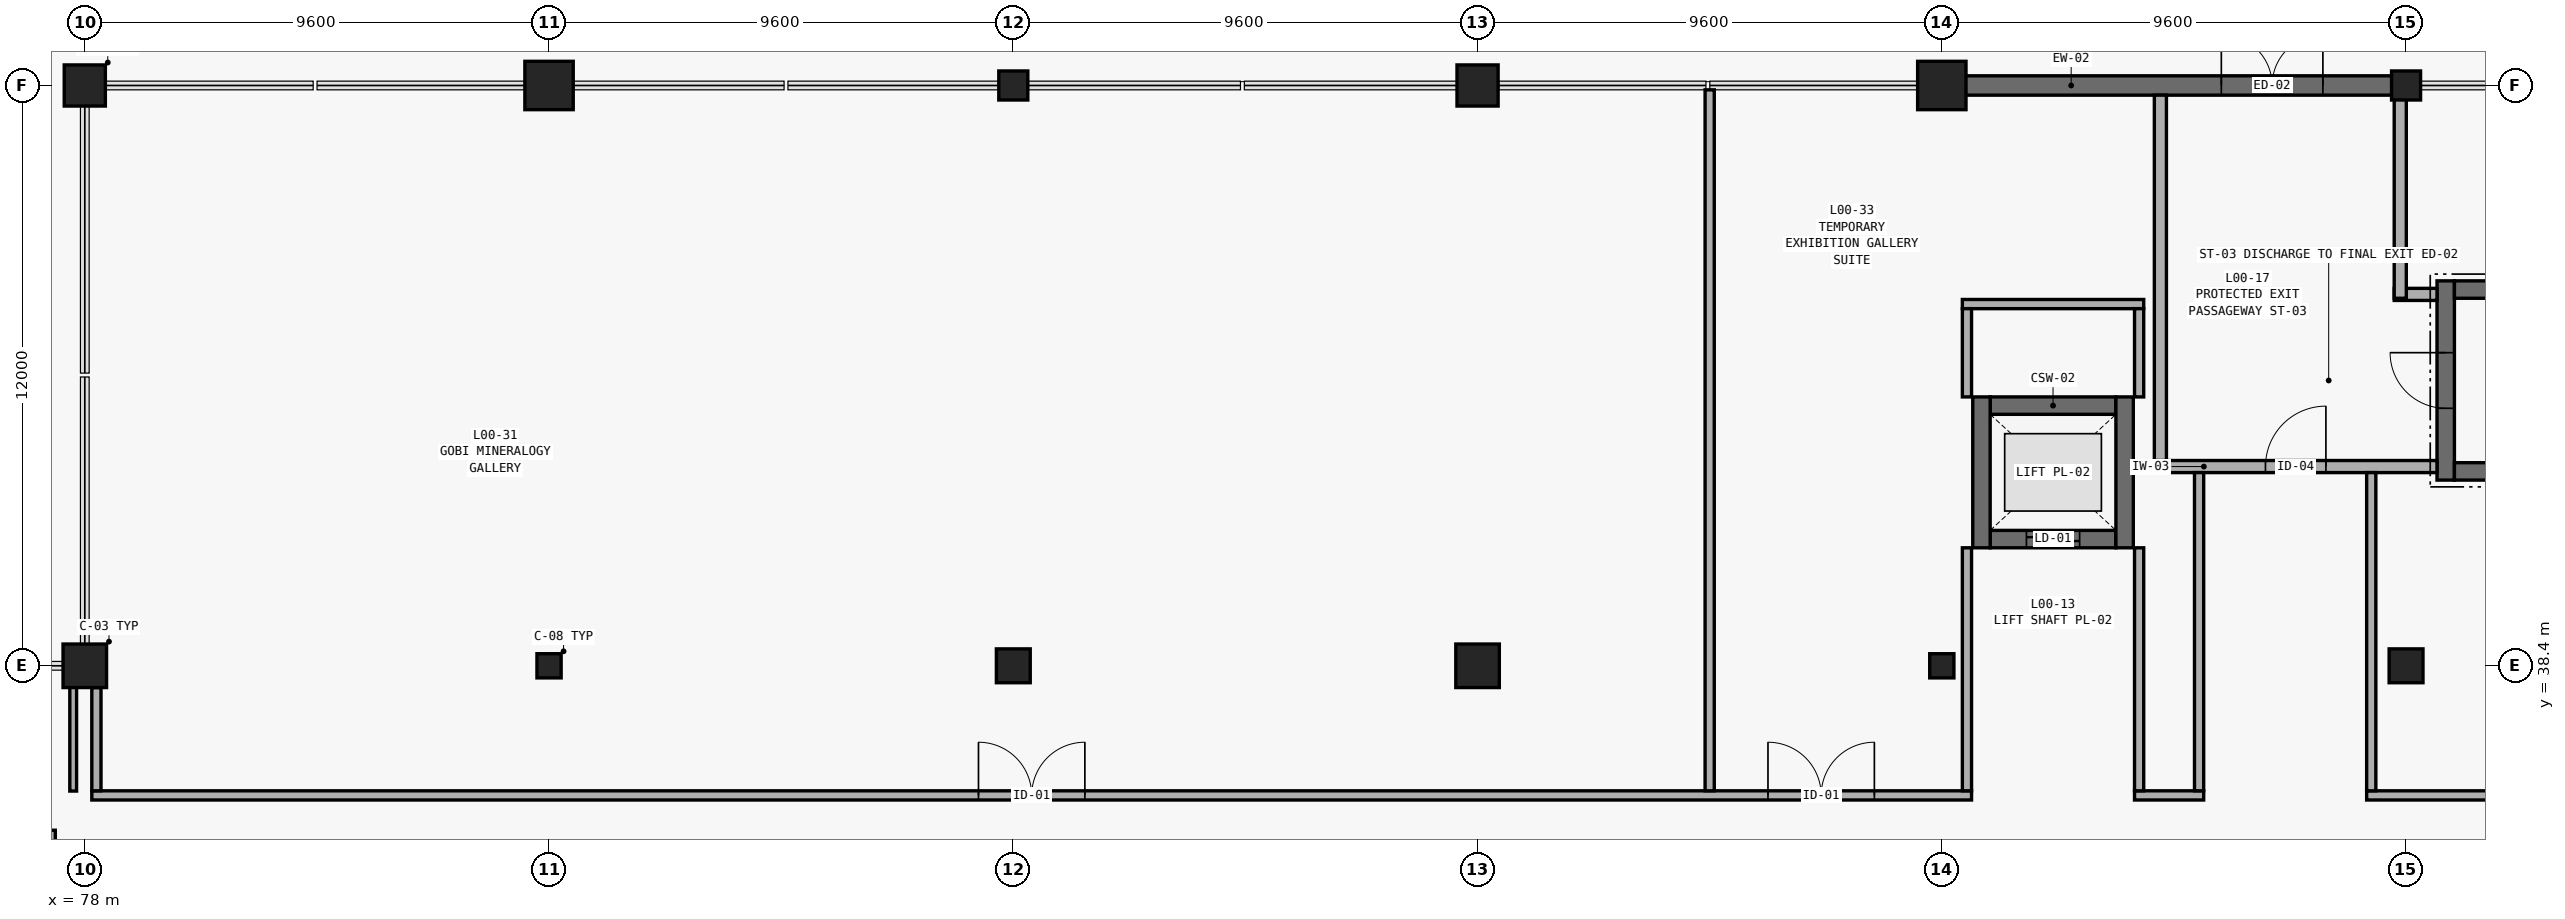
"""IFC4 building model, lengths in metres.
Left out: names, types, materials, properties, quantities, classifications, styles, units other than length and angle.
Written with IfcOpenShell. Run it as: python <this file> out.ifc"""

import sys

from ifc_helpers import new_model, si_unit, direction, frame, frame_2d, origin, origin_2d, place, context, subcontext, project, spatial, rectangle, extrude, element, fill, save


model = new_model("IFC4")
c1 = context("Model", 3, precision=1e-05, world=origin(), true_north=direction((0.0, 1.0)))
c2 = subcontext(c1, "Body", "Model", "MODEL_VIEW")
j1 = project(units=[si_unit("LENGTHUNIT", "METRE"), si_unit("PLANEANGLEUNIT", "RADIAN")], contexts=[c1])
p1 = place(None, origin())
s1 = spatial("IfcSite", under=j1, at=p1, CompositionType="ELEMENT")
p2 = place(p1, origin())
s2 = spatial("IfcBuilding", under=s1, at=p2, CompositionType="ELEMENT")
p3 = place(p2, origin())
s3 = spatial("IfcBuildingStorey", under=s2, at=p3, CompositionType="ELEMENT", Elevation=0.0)
p4 = place(p3, frame((78.0, 38.4, 0.0), z_axis=(0.0, 0.0, 1.0), x_axis=(1.0, 0.0, 0.0)))
e1 = element("IfcColumn", 1, at=p4, inside=s3, PredefinedType="COLUMN", context=c2, shape_type="SweptSolid", body=[
    extrude(rectangle(XDim=0.9, YDim=0.9, at=origin_2d()), origin(), (0.0, 0.0, 1.0), 4.8),
])
p5 = place(p3, frame((78.0, 50.4, 0.0), z_axis=(0.0, 0.0, 1.0), x_axis=(1.0, 0.0, 0.0)))
e2 = element("IfcColumn", 2, at=p5, inside=s3, PredefinedType="COLUMN", context=c2, shape_type="SweptSolid", body=[
    extrude(rectangle(XDim=0.85, YDim=0.85, at=origin_2d()), origin(), (0.0, 0.0, 1.0), 4.8),
])
p6 = place(p3, frame((87.6, 38.4, 0.0), z_axis=(0.0, 0.0, 1.0), x_axis=(1.0, 0.0, 0.0)))
e3 = element("IfcColumn", 3, at=p6, inside=s3, PredefinedType="COLUMN", context=c2, shape_type="SweptSolid", body=[
    extrude(rectangle(XDim=0.5, YDim=0.5, at=origin_2d()), origin(), (0.0, 0.0, 1.0), 4.8),
])
p7 = place(p3, frame((87.6, 50.4, 0.0), z_axis=(0.0, 0.0, 1.0), x_axis=(1.0, 0.0, 0.0)))
e4 = element("IfcColumn", 4, at=p7, inside=s3, PredefinedType="COLUMN", context=c2, shape_type="SweptSolid", body=[
    extrude(rectangle(XDim=1.0, YDim=1.0, at=origin_2d()), origin(), (0.0, 0.0, 1.0), 4.8),
])
p8 = place(p3, frame((97.2, 38.4, 0.0), z_axis=(0.0, 0.0, 1.0), x_axis=(1.0, 0.0, 0.0)))
e5 = element("IfcColumn", 5, at=p8, inside=s3, PredefinedType="COLUMN", context=c2, shape_type="SweptSolid", body=[
    extrude(rectangle(XDim=0.7, YDim=0.7, at=origin_2d()), origin(), (0.0, 0.0, 1.0), 4.8),
])
p9 = place(p3, frame((97.2, 50.4, 0.0), z_axis=(0.0, 0.0, 1.0), x_axis=(1.0, 0.0, 0.0)))
e6 = element("IfcColumn", 6, at=p9, inside=s3, PredefinedType="COLUMN", context=c2, shape_type="SweptSolid", body=[
    extrude(rectangle(XDim=0.6, YDim=0.6, at=origin_2d()), origin(), (0.0, 0.0, 1.0), 4.8),
])
p10 = place(p3, frame((106.8, 38.4, 0.0), z_axis=(0.0, 0.0, 1.0), x_axis=(1.0, 0.0, 0.0)))
e7 = element("IfcColumn", 7, at=p10, inside=s3, PredefinedType="COLUMN", context=c2, shape_type="SweptSolid", body=[
    extrude(rectangle(XDim=0.9, YDim=0.9, at=origin_2d()), origin(), (0.0, 0.0, 1.0), 4.8),
])
p11 = place(p3, frame((106.8, 50.4, 0.0), z_axis=(0.0, 0.0, 1.0), x_axis=(1.0, 0.0, 0.0)))
e8 = element("IfcColumn", 8, at=p11, inside=s3, PredefinedType="COLUMN", context=c2, shape_type="SweptSolid", body=[
    extrude(rectangle(XDim=0.85, YDim=0.85, at=origin_2d()), origin(), (0.0, 0.0, 1.0), 4.8),
])
p12 = place(p3, frame((116.4, 38.4, 0.0), z_axis=(0.0, 0.0, 1.0), x_axis=(1.0, 0.0, 0.0)))
e9 = element("IfcColumn", 9, at=p12, inside=s3, PredefinedType="COLUMN", context=c2, shape_type="SweptSolid", body=[
    extrude(rectangle(XDim=0.5, YDim=0.5, at=origin_2d()), origin(), (0.0, 0.0, 1.0), 4.8),
])
p13 = place(p3, frame((116.4, 50.4, 0.0), z_axis=(0.0, 0.0, 1.0), x_axis=(1.0, 0.0, 0.0)))
e10 = element("IfcColumn", 10, at=p13, inside=s3, PredefinedType="COLUMN", context=c2, shape_type="SweptSolid", body=[
    extrude(rectangle(XDim=1.0, YDim=1.0, at=origin_2d()), origin(), (0.0, 0.0, 1.0), 4.8),
])
p14 = place(p3, frame((126.0, 38.4, 0.0), z_axis=(0.0, 0.0, 1.0), x_axis=(1.0, 0.0, 0.0)))
e11 = element("IfcColumn", 11, at=p14, inside=s3, PredefinedType="COLUMN", context=c2, shape_type="SweptSolid", body=[
    extrude(rectangle(XDim=0.7, YDim=0.7, at=origin_2d()), origin(), (0.0, 0.0, 1.0), 4.8),
])
p15 = place(p3, frame((126.0, 50.4, 0.0), z_axis=(0.0, 0.0, 1.0), x_axis=(1.0, 0.0, 0.0)))
e12 = element("IfcColumn", 12, at=p15, inside=s3, PredefinedType="COLUMN", context=c2, shape_type="SweptSolid", body=[
    extrude(rectangle(XDim=0.6, YDim=0.6, at=origin_2d()), origin(), (0.0, 0.0, 1.0), 4.8),
])
p16 = place(p3, frame((126.18, 50.4, 0.0), z_axis=(0.0, 0.0, 1.0), x_axis=(-1.0, 0.0, 0.0)))
e13 = element("IfcWall", 13, at=p16, inside=s3, PredefinedType="STANDARD", context=c2, shape_type="SweptSolid", body=[
    extrude(rectangle(XDim=9.96, YDim=0.4, at=frame_2d((4.98, 0.0))), origin(), (0.0, 0.0, 1.0), 4.5),
])
p17 = place(p16, frame((1.9, 0.0, 0.0)))
e14 = element("IfcOpeningElement", 14, at=p17, cuts=e13, PredefinedType="OPENING", context=c2, shape_type="SweptSolid", body=[
    extrude(rectangle(XDim=2.1, YDim=2.6, at=frame_2d((1.05, 1.3))), frame((0.0, 0.215, 0.0), z_axis=(0.0, -1.0, 0.0), x_axis=(1.0, 0.0, 0.0)), (0.0, 0.0, 1.0), 0.43),
])
p18 = place(p3, frame((126.82, 42.24, 0.0), z_axis=(0.0, 0.0, 1.0), x_axis=(0.0, 1.0, 0.0)))
e15 = element("IfcWall", 15, at=p18, inside=s3, PredefinedType="SHEAR", context=c2, shape_type="SweptSolid", body=[
    extrude(rectangle(XDim=4.12, YDim=0.36, at=frame_2d((2.06, 0.0))), origin(), (0.0, 0.0, 1.0), 4.5),
])
p19 = place(p18, frame((1.485, 0.0, 0.0)))
e16 = element("IfcOpeningElement", 16, at=p19, cuts=e15, PredefinedType="OPENING", context=c2, shape_type="SweptSolid", body=[
    extrude(rectangle(XDim=1.15, YDim=2.15, at=frame_2d((0.575, 1.075))), frame((0.0, 0.195, 0.0), z_axis=(0.0, -1.0, 0.0), x_axis=(1.0, 0.0, 0.0)), (0.0, 0.0, 1.0), 0.39),
])
for number, where, z_axis, x_axis in (
    (17, (127.0, 46.18, 0.0), (0.0, 0.0, 1.0), (1.0, 0.0, 0.0)),
    (18, (127.0, 42.42, 0.0), (0.0, 0.0, 1.0), (1.0, 0.0, 0.0)),
):
    element("IfcWall", number, at=place(p3, frame(where, z_axis=z_axis, x_axis=x_axis)), inside=s3, PredefinedType="SHEAR", context=c2, shape_type="SweptSolid", body=[
        extrude(rectangle(XDim=7.4, YDim=0.36, at=frame_2d((3.7, 0.0))), origin(), (0.0, 0.0, 1.0), 4.5),
    ])
p20 = place(p3, frame((117.4, 43.78, 0.0), z_axis=(0.0, 0.0, 1.0), x_axis=(1.0, 0.0, 0.0)))
e19 = element("IfcWall", 19, at=p20, inside=s3, PredefinedType="SHEAR", context=c2, shape_type="SweptSolid", body=[
    extrude(rectangle(XDim=2.6, YDim=0.36, at=frame_2d((1.3, 0.0))), origin(), (0.0, 0.0, 1.0), 4.5),
])
p21 = place(p3, frame((117.4, 41.02, 0.0), z_axis=(0.0, 0.0, 1.0), x_axis=(1.0, 0.0, 0.0)))
e20 = element("IfcWall", 20, at=p21, inside=s3, PredefinedType="SHEAR", context=c2, shape_type="SweptSolid", body=[
    extrude(rectangle(XDim=2.6, YDim=0.36, at=frame_2d((1.3, 0.0))), origin(), (0.0, 0.0, 1.0), 4.5),
])
p22 = place(p21, frame((0.75, 0.0, 0.0)))
e21 = element("IfcOpeningElement", 21, at=p22, cuts=e20, PredefinedType="OPENING", context=c2, shape_type="SweptSolid", body=[
    extrude(rectangle(XDim=1.1, YDim=2.15, at=frame_2d((0.55, 1.075))), frame((0.0, 0.195, 0.0), z_axis=(0.0, -1.0, 0.0), x_axis=(1.0, 0.0, 0.0)), (0.0, 0.0, 1.0), 0.39),
])
for number, where, z_axis, x_axis in (
    (22, (117.22, 40.84, 0.0), (0.0, 0.0, 1.0), (0.0, 1.0, 0.0)),
    (23, (120.18, 40.84, 0.0), (0.0, 0.0, 1.0), (0.0, 1.0, 0.0)),
):
    element("IfcWall", number, at=place(p3, frame(where, z_axis=z_axis, x_axis=x_axis)), inside=s3, PredefinedType="SHEAR", context=c2, shape_type="SweptSolid", body=[
        extrude(rectangle(XDim=3.12, YDim=0.36, at=frame_2d((1.56, 0.0))), origin(), (0.0, 0.0, 1.0), 4.5),
    ])
p23 = place(p3, frame((78.145, 35.72, 0.0), z_axis=(0.0, 0.0, 1.0), x_axis=(1.0, 0.0, 0.0)))
e24 = element("IfcWall", 24, at=p23, inside=s3, PredefinedType="PARTITIONING", context=c2, shape_type="SweptSolid", body=[
    extrude(rectangle(XDim=38.87, YDim=0.19, at=frame_2d((19.435, 0.0))), origin(), (0.0, 0.0, 1.0), 3.38),
])
p24 = place(p23, frame((18.335, 0.0, 0.0)))
e25 = element("IfcOpeningElement", 25, at=p24, cuts=e24, PredefinedType="OPENING", context=c2, shape_type="SweptSolid", body=[
    extrude(rectangle(XDim=2.2, YDim=2.45, at=frame_2d((1.1, 1.225))), frame((0.0, 0.11, 0.0), z_axis=(0.0, -1.0, 0.0), x_axis=(1.0, 0.0, 0.0)), (0.0, 0.0, 1.0), 0.22),
])
p25 = place(p23, frame((34.66, 0.0, 0.0)))
e26 = element("IfcOpeningElement", 26, at=p25, cuts=e24, PredefinedType="OPENING", context=c2, shape_type="SweptSolid", body=[
    extrude(rectangle(XDim=2.2, YDim=2.45, at=frame_2d((1.1, 1.225))), frame((0.0, 0.11, 0.0), z_axis=(0.0, -1.0, 0.0), x_axis=(1.0, 0.0, 0.0)), (0.0, 0.0, 1.0), 0.22),
])
p26 = place(p3, frame((120.385, 35.72, 0.0), z_axis=(0.0, 0.0, 1.0), x_axis=(1.0, 0.0, 0.0)))
e27 = element("IfcWall", 27, at=p26, inside=s3, PredefinedType="PARTITIONING", context=c2, shape_type="SweptSolid", body=[
    extrude(rectangle(XDim=1.43, YDim=0.19, at=frame_2d((0.715, 0.0))), origin(), (0.0, 0.0, 1.0), 3.38),
])
p27 = place(p3, frame((125.185, 35.72, 0.0), z_axis=(0.0, 0.0, 1.0), x_axis=(1.0, 0.0, 0.0)))
e28 = element("IfcWall", 28, at=p27, inside=s3, PredefinedType="PARTITIONING", context=c2, shape_type="SweptSolid", body=[
    extrude(rectangle(XDim=19.925, YDim=0.19, at=frame_2d((9.962, 0.0))), origin(), (0.0, 0.0, 1.0), 3.38),
])
p28 = place(p27, frame((11.253, 0.0, 0.0)))
e29 = element("IfcOpeningElement", 29, at=p28, cuts=e28, PredefinedType="OPENING", context=c2, shape_type="SweptSolid", body=[
    extrude(rectangle(XDim=2.2, YDim=2.45, at=frame_2d((1.1, 1.225))), frame((0.0, 0.11, 0.0), z_axis=(0.0, -1.0, 0.0), x_axis=(1.0, 0.0, 0.0)), (0.0, 0.0, 1.0), 0.22),
])
p29 = place(p3, frame((120.795, 42.52, 0.0), z_axis=(0.0, 0.0, 1.0), x_axis=(1.0, 0.0, 0.0)))
e30 = element("IfcWall", 30, at=p29, inside=s3, PredefinedType="PARTITIONING", context=c2, shape_type="SweptSolid", body=[
    extrude(rectangle(XDim=5.845, YDim=0.25, at=frame_2d((2.922, 0.0))), origin(), (0.0, 0.0, 1.0), 3.38),
])
p30 = place(p29, frame((2.298, 0.0, 0.0)))
e31 = element("IfcOpeningElement", 31, at=p30, cuts=e30, PredefinedType="OPENING", context=c2, shape_type="SweptSolid", body=[
    extrude(rectangle(XDim=1.25, YDim=2.15, at=frame_2d((0.625, 1.075))), frame((0.0, 0.14, 0.0), z_axis=(0.0, -1.0, 0.0), x_axis=(1.0, 0.0, 0.0)), (0.0, 0.0, 1.0), 0.28),
])
p31 = place(p3, frame((116.825, 45.88, 0.0), z_axis=(0.0, 0.0, 1.0), x_axis=(1.0, 0.0, 0.0)))
e32 = element("IfcWall", 32, at=p31, inside=s3, PredefinedType="PARTITIONING", context=c2, shape_type="SweptSolid", body=[
    extrude(rectangle(XDim=3.75, YDim=0.19, at=frame_2d((1.875, 0.0))), origin(), (0.0, 0.0, 1.0), 3.38),
])
p32 = place(p3, frame((125.755, 46.08, 0.0), z_axis=(0.0, 0.0, 1.0), x_axis=(1.0, 0.0, 0.0)))
e33 = element("IfcWall", 33, at=p32, inside=s3, PredefinedType="PARTITIONING", context=c2, shape_type="SweptSolid", body=[
    extrude(rectangle(XDim=0.885, YDim=0.25, at=frame_2d((0.442, 0.0))), origin(), (0.0, 0.0, 1.0), 3.38),
])
p33 = place(p3, frame((77.32, 32.55, 0.0), z_axis=(0.0, 0.0, 1.0), x_axis=(0.0, 1.0, 0.0)))
e34 = element("IfcWall", 34, at=p33, inside=s3, PredefinedType="PARTITIONING", context=c2, shape_type="SweptSolid", body=[
    extrude(rectangle(XDim=2.45, YDim=0.14, at=frame_2d((1.225, 0.0))), origin(), (0.0, 0.0, 1.0), 3.38),
])
p34 = place(p3, frame((77.76, 35.81, 0.0), z_axis=(0.0, 0.0, 1.0), x_axis=(0.0, 1.0, 0.0)))
e35 = element("IfcWall", 35, at=p34, inside=s3, PredefinedType="PARTITIONING", context=c2, shape_type="SweptSolid", body=[
    extrude(rectangle(XDim=2.5, YDim=0.14, at=frame_2d((1.25, 0.0))), origin(), (0.0, 0.0, 1.0), 3.38),
])
p35 = place(p3, frame((78.24, 35.815, 0.0), z_axis=(0.0, 0.0, 1.0), x_axis=(0.0, 1.0, 0.0)))
e36 = element("IfcWall", 36, at=p35, inside=s3, PredefinedType="PARTITIONING", context=c2, shape_type="SweptSolid", body=[
    extrude(rectangle(XDim=2.135, YDim=0.19, at=frame_2d((1.067, 0.0))), origin(), (0.0, 0.0, 1.0), 3.38),
])
p36 = place(p3, frame((111.6, 35.815, 0.0), z_axis=(0.0, 0.0, 1.0), x_axis=(0.0, 1.0, 0.0)))
e37 = element("IfcWall", 37, at=p36, inside=s3, PredefinedType="PARTITIONING", context=c2, shape_type="SweptSolid", body=[
    extrude(rectangle(XDim=14.495, YDim=0.19, at=frame_2d((7.248, 0.0))), origin(), (0.0, 0.0, 1.0), 3.38),
])
p37 = place(p3, frame((116.92, 35.815, 0.0), z_axis=(0.0, 0.0, 1.0), x_axis=(0.0, 1.0, 0.0)))
e38 = element("IfcWall", 38, at=p37, inside=s3, PredefinedType="PARTITIONING", context=c2, shape_type="SweptSolid", body=[
    extrude(rectangle(XDim=5.025, YDim=0.19, at=frame_2d((2.513, 0.0))), origin(), (0.0, 0.0, 1.0), 3.38),
])
p38 = place(p3, frame((116.92, 43.96, 0.0), z_axis=(0.0, 0.0, 1.0), x_axis=(0.0, 1.0, 0.0)))
e39 = element("IfcWall", 39, at=p38, inside=s3, PredefinedType="PARTITIONING", context=c2, shape_type="SweptSolid", body=[
    extrude(rectangle(XDim=1.825, YDim=0.19, at=frame_2d((0.913, 0.0))), origin(), (0.0, 0.0, 1.0), 3.38),
])
p39 = place(p3, frame((120.48, 35.815, 0.0), z_axis=(0.0, 0.0, 1.0), x_axis=(0.0, 1.0, 0.0)))
e40 = element("IfcWall", 40, at=p39, inside=s3, PredefinedType="PARTITIONING", context=c2, shape_type="SweptSolid", body=[
    extrude(rectangle(XDim=5.025, YDim=0.19, at=frame_2d((2.513, 0.0))), origin(), (0.0, 0.0, 1.0), 3.38),
])
p40 = place(p3, frame((120.48, 43.96, 0.0), z_axis=(0.0, 0.0, 1.0), x_axis=(0.0, 1.0, 0.0)))
e41 = element("IfcWall", 41, at=p40, inside=s3, PredefinedType="PARTITIONING", context=c2, shape_type="SweptSolid", body=[
    extrude(rectangle(XDim=1.825, YDim=0.19, at=frame_2d((0.913, 0.0))), origin(), (0.0, 0.0, 1.0), 3.38),
])
p41 = place(p3, frame((120.92, 42.645, 0.0), z_axis=(0.0, 0.0, 1.0), x_axis=(0.0, 1.0, 0.0)))
e42 = element("IfcWall", 42, at=p41, inside=s3, PredefinedType="PARTITIONING", context=c2, shape_type="SweptSolid", body=[
    extrude(rectangle(XDim=7.555, YDim=0.25, at=frame_2d((3.777, 0.0))), origin(), (0.0, 0.0, 1.0), 3.38),
])
for number, where, z_axis, x_axis in (
    (43, (121.72, 35.815, 0.0), (0.0, 0.0, 1.0), (0.0, 1.0, 0.0)),
    (44, (125.28, 35.815, 0.0), (0.0, 0.0, 1.0), (0.0, 1.0, 0.0)),
):
    element("IfcWall", number, at=place(p3, frame(where, z_axis=z_axis, x_axis=x_axis)), inside=s3, PredefinedType="PARTITIONING", context=c2, shape_type="SweptSolid", body=[
        extrude(rectangle(XDim=6.58, YDim=0.19, at=frame_2d((3.29, 0.0))), origin(), (0.0, 0.0, 1.0), 3.38),
    ])
p42 = place(p3, frame((125.88, 46.0, 0.0), z_axis=(0.0, 0.0, 1.0), x_axis=(0.0, 1.0, 0.0)))
e45 = element("IfcWall", 45, at=p42, inside=s3, PredefinedType="PARTITIONING", context=c2, shape_type="SweptSolid", body=[
    extrude(rectangle(XDim=4.2, YDim=0.25, at=frame_2d((2.1, 0.0))), origin(), (0.0, 0.0, 1.0), 3.38),
])
p43 = place(p17, frame((2.1, 0.0, 0.0), z_axis=(0.0, 0.0, 1.0), x_axis=(-1.0, 0.0, 0.0)))
e46 = element("IfcDoor", 46, at=p43, inside=s3, OperationType="DOUBLE_DOOR_SINGLE_SWING", PredefinedType="DOOR", context=c2, shape_type="SweptSolid", body=[
    extrude(rectangle(XDim=2.1, YDim=2.6, at=frame_2d((1.05, 1.3))), frame((0.0, 0.025, 0.0), z_axis=(0.0, -1.0, 0.0), x_axis=(1.0, 0.0, 0.0)), (0.0, 0.0, 1.0), 0.05),
])
fill(e14, e46)
p44 = place(p19, origin())
e47 = element("IfcDoor", 47, at=p44, inside=s3, OperationType="SINGLE_SWING_RIGHT", PredefinedType="DOOR", context=c2, shape_type="SweptSolid", body=[
    extrude(rectangle(XDim=1.15, YDim=2.15, at=frame_2d((0.575, 1.075))), frame((0.0, 0.025, 0.0), z_axis=(0.0, -1.0, 0.0), x_axis=(1.0, 0.0, 0.0)), (0.0, 0.0, 1.0), 0.05),
])
fill(e16, e47)
p45 = place(p22, origin())
e48 = element("IfcDoor", 48, at=p45, inside=s3, OperationType="DOUBLE_DOOR_SLIDING", PredefinedType="DOOR", context=c2, shape_type="SweptSolid", body=[
    extrude(rectangle(XDim=1.1, YDim=2.15, at=frame_2d((0.55, 1.075))), frame((0.0, 0.025, 0.0), z_axis=(0.0, -1.0, 0.0), x_axis=(1.0, 0.0, 0.0)), (0.0, 0.0, 1.0), 0.05),
])
fill(e21, e48)
p46 = place(p30, origin())
e49 = element("IfcDoor", 49, at=p46, inside=s3, OperationType="SINGLE_SWING_RIGHT", PredefinedType="DOOR", context=c2, shape_type="SweptSolid", body=[
    extrude(rectangle(XDim=1.25, YDim=2.15, at=frame_2d((0.625, 1.075))), frame((0.0, 0.025, 0.0), z_axis=(0.0, -1.0, 0.0), x_axis=(1.0, 0.0, 0.0)), (0.0, 0.0, 1.0), 0.05),
])
fill(e31, e49)
p47 = place(p24, origin())
e50 = element("IfcDoor", 50, at=p47, inside=s3, OperationType="DOUBLE_DOOR_SINGLE_SWING", PredefinedType="DOOR", context=c2, shape_type="SweptSolid", body=[
    extrude(rectangle(XDim=2.2, YDim=2.45, at=frame_2d((1.1, 1.225))), frame((0.0, 0.025, 0.0), z_axis=(0.0, -1.0, 0.0), x_axis=(1.0, 0.0, 0.0)), (0.0, 0.0, 1.0), 0.05),
])
fill(e25, e50)
p48 = place(p25, origin())
e51 = element("IfcDoor", 51, at=p48, inside=s3, OperationType="DOUBLE_DOOR_SINGLE_SWING", PredefinedType="DOOR", context=c2, shape_type="SweptSolid", body=[
    extrude(rectangle(XDim=2.2, YDim=2.45, at=frame_2d((1.1, 1.225))), frame((0.0, 0.025, 0.0), z_axis=(0.0, -1.0, 0.0), x_axis=(1.0, 0.0, 0.0)), (0.0, 0.0, 1.0), 0.05),
])
fill(e26, e51)
save(model, sys.argv[1])
